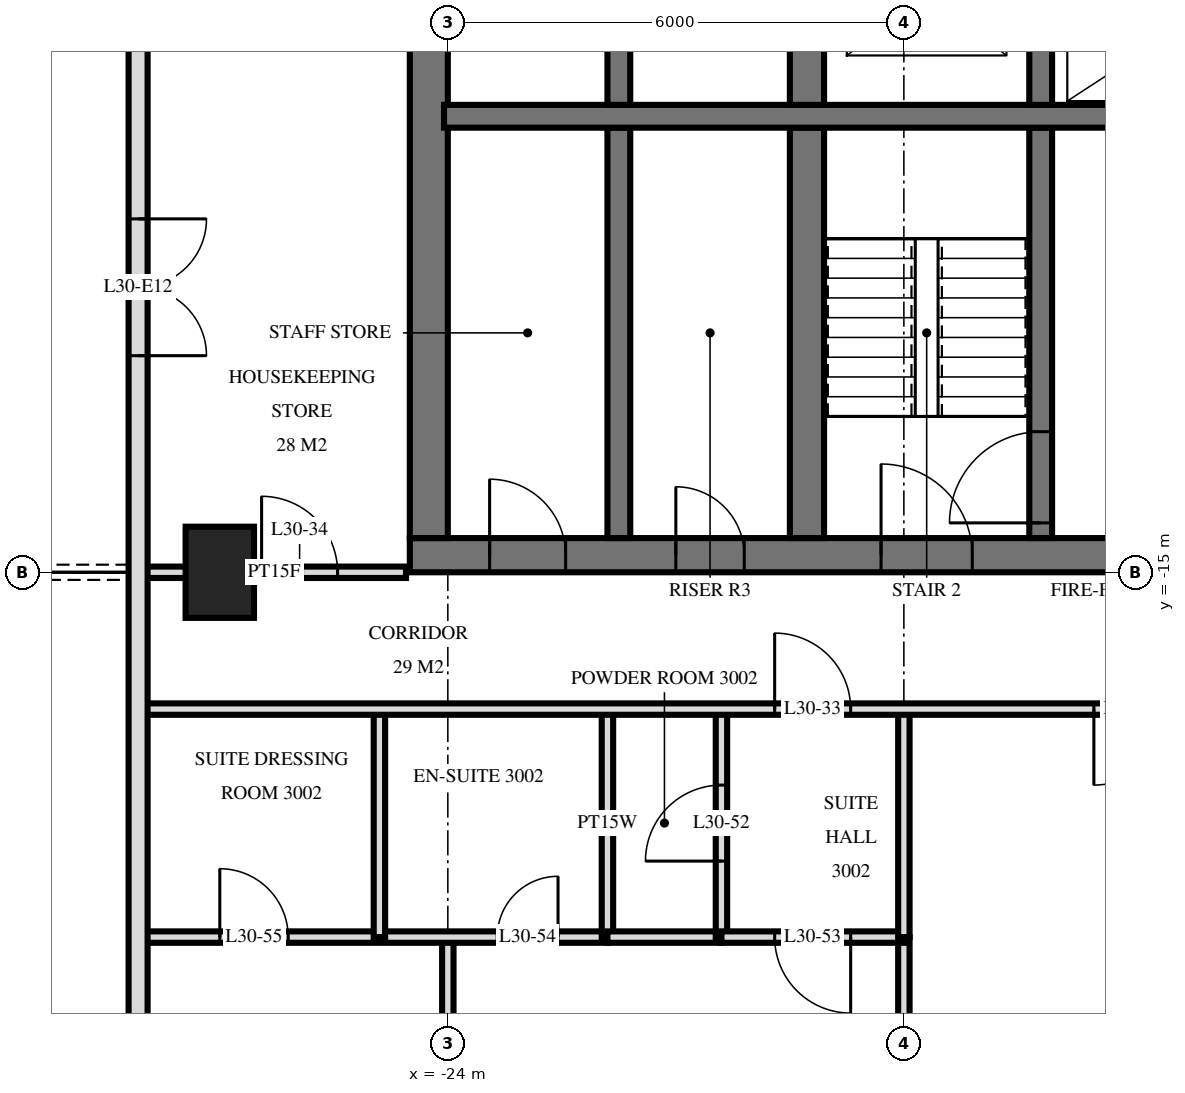
"""IFC4 building model, lengths in metres.
Left out: names, types, materials, properties, quantities, classifications, styles, units other than length and angle.
Written with IfcOpenShell. Run it as: python <this file> out.ifc"""

import sys

from ifc_helpers import new_model, si_unit, direction, frame, frame_2d, origin, origin_2d, place, context, subcontext, project, spatial, rectangle, extrude, element, fill, save


model = new_model("IFC4")
c1 = context("Model", 3, precision=1e-05, world=origin(), true_north=direction((0.0, 1.0)))
c2 = subcontext(c1, "Body", "Model", "MODEL_VIEW")
j1 = project(units=[si_unit("LENGTHUNIT", "METRE"), si_unit("PLANEANGLEUNIT", "RADIAN")], contexts=[c1])
p1 = place(None, origin())
s1 = spatial("IfcSite", under=j1, at=p1, CompositionType="ELEMENT")
p2 = place(p1, origin())
s2 = spatial("IfcBuilding", under=s1, at=p2, CompositionType="ELEMENT")
p3 = place(p2, frame((0.0, 0.0, 120.0)))
s3 = spatial("IfcBuildingStorey", under=s2, at=p3, CompositionType="ELEMENT", Elevation=120.0)
p4 = place(p3, frame((-27.0, -15.0, 0.0), z_axis=(0.0, 0.0, 1.0), x_axis=(0.0, 1.0, 0.0)))
e1 = element("IfcColumn", 1, at=p4, inside=s3, PredefinedType="COLUMN", context=c2, shape_type="SweptSolid", body=[
    extrude(rectangle(XDim=1.2, YDim=0.9, at=origin_2d()), origin(), (0.0, 0.0, 1.0), 3.6),
])
p5 = place(p3, frame((-24.5, -14.775, 0.0), z_axis=(0.0, 0.0, 1.0), x_axis=(1.0, 0.0, 0.0)))
e2 = element("IfcWall", 2, at=p5, inside=s3, PredefinedType="SHEAR", context=c2, shape_type="SweptSolid", body=[
    extrude(rectangle(XDim=14.5, YDim=0.45, at=frame_2d((7.25, 0.0))), origin(), (0.0, 0.0, 1.0), 3.6),
])
p6 = place(p5, frame((6.2, 0.0, 0.0)))
e3 = element("IfcOpeningElement", 3, at=p6, cuts=e2, PredefinedType="OPENING", context=c2, shape_type="SweptSolid", body=[
    extrude(rectangle(XDim=1.2, YDim=2.1, at=frame_2d((0.6, 1.05))), frame((0.0, 0.235, 0.0), z_axis=(0.0, -1.0, 0.0), x_axis=(1.0, 0.0, 0.0)), (0.0, 0.0, 1.0), 0.47),
])
p7 = place(p5, frame((9.25, 0.0, 0.0)))
e4 = element("IfcOpeningElement", 4, at=p7, cuts=e2, PredefinedType="OPENING", context=c2, shape_type="SweptSolid", body=[
    extrude(rectangle(XDim=1.1, YDim=2.1, at=frame_2d((0.55, 1.05))), frame((0.0, 0.235, 0.0), z_axis=(0.0, -1.0, 0.0), x_axis=(1.0, 0.0, 0.0)), (0.0, 0.0, 1.0), 0.47),
])
p8 = place(p5, frame((3.5, 0.0, 0.0)))
e5 = element("IfcOpeningElement", 5, at=p8, cuts=e2, PredefinedType="OPENING", context=c2, shape_type="SweptSolid", body=[
    extrude(rectangle(XDim=0.9, YDim=2.1, at=frame_2d((0.45, 1.05))), frame((0.0, 0.235, 0.0), z_axis=(0.0, -1.0, 0.0), x_axis=(1.0, 0.0, 0.0)), (0.0, 0.0, 1.0), 0.47),
])
p9 = place(p5, frame((1.05, 0.0, 0.0)))
e6 = element("IfcOpeningElement", 6, at=p9, cuts=e2, PredefinedType="OPENING", context=c2, shape_type="SweptSolid", body=[
    extrude(rectangle(XDim=1.0, YDim=2.1, at=frame_2d((0.5, 1.05))), frame((0.0, 0.235, 0.0), z_axis=(0.0, -1.0, 0.0), x_axis=(1.0, 0.0, 0.0)), (0.0, 0.0, 1.0), 0.47),
])
p10 = place(p3, frame((-24.25, -14.55, 0.0), z_axis=(0.0, 0.0, 1.0), x_axis=(0.0, 1.0, 0.0)))
e7 = element("IfcWall", 7, at=p10, inside=s3, PredefinedType="SHEAR", context=c2, shape_type="SweptSolid", body=[
    extrude(rectangle(XDim=14.1, YDim=0.5, at=frame_2d((7.05, 0.0))), origin(), (0.0, 0.0, 1.0), 3.6),
])
p11 = place(p3, frame((-24.05, -9.0, 0.0), z_axis=(0.0, 0.0, 1.0), x_axis=(1.0, 0.0, 0.0)))
e8 = element("IfcWall", 8, at=p11, inside=s3, PredefinedType="SHEAR", context=c2, shape_type="SweptSolid", body=[
    extrude(rectangle(XDim=13.7, YDim=0.3, at=frame_2d((6.85, 0.0))), origin(), (0.0, 0.0, 1.0), 3.6),
])
p12 = place(p11, frame((8.8, 0.0, 0.0)))
e9 = element("IfcOpeningElement", 9, at=p12, cuts=e8, PredefinedType="OPENING", context=c2, shape_type="SweptSolid", body=[
    extrude(rectangle(XDim=1.1, YDim=2.1, at=frame_2d((0.55, 1.05))), frame((0.0, 0.16, 0.0), z_axis=(0.0, -1.0, 0.0), x_axis=(1.0, 0.0, 0.0)), (0.0, 0.0, 1.0), 0.32),
])
p13 = place(p3, frame((-16.2, -8.85, 0.0), z_axis=(0.0, 0.0, 1.0), x_axis=(0.0, 1.0, 0.0)))
e10 = element("IfcWall", 10, at=p13, inside=s3, PredefinedType="SHEAR", context=c2, shape_type="SweptSolid", body=[
    extrude(rectangle(XDim=2.3, YDim=0.3, at=frame_2d((1.15, 0.0))), origin(), (0.0, 0.0, 1.0), 3.6),
])
p14 = place(p3, frame((-16.2, -14.55, 0.0), z_axis=(0.0, 0.0, 1.0), x_axis=(0.0, 1.0, 0.0)))
e11 = element("IfcWall", 11, at=p14, inside=s3, PredefinedType="SHEAR", context=c2, shape_type="SweptSolid", body=[
    extrude(rectangle(XDim=5.4, YDim=0.3, at=frame_2d((2.7, 0.0))), origin(), (0.0, 0.0, 1.0), 3.6),
])
p15 = place(p14, frame((0.2, 0.0, 0.0)))
e12 = element("IfcOpeningElement", 12, at=p15, cuts=e11, PredefinedType="OPENING", context=c2, shape_type="SweptSolid", body=[
    extrude(rectangle(XDim=1.2, YDim=2.1, at=frame_2d((0.6, 1.05))), frame((0.0, 0.16, 0.0), z_axis=(0.0, -1.0, 0.0), x_axis=(1.0, 0.0, 0.0)), (0.0, 0.0, 1.0), 0.32),
])
p16 = place(p3, frame((-19.275, -8.85, 0.0), z_axis=(0.0, 0.0, 1.0), x_axis=(0.0, 1.0, 0.0)))
e13 = element("IfcWall", 13, at=p16, inside=s3, PredefinedType="SHEAR", context=c2, shape_type="SweptSolid", body=[
    extrude(rectangle(XDim=2.3, YDim=0.45, at=frame_2d((1.15, 0.0))), origin(), (0.0, 0.0, 1.0), 3.6),
])
p17 = place(p3, frame((-19.275, -14.55, 0.0), z_axis=(0.0, 0.0, 1.0), x_axis=(0.0, 1.0, 0.0)))
e14 = element("IfcWall", 14, at=p17, inside=s3, PredefinedType="SHEAR", context=c2, shape_type="SweptSolid", body=[
    extrude(rectangle(XDim=5.4, YDim=0.45, at=frame_2d((2.7, 0.0))), origin(), (0.0, 0.0, 1.0), 3.6),
])
p18 = place(p3, frame((-21.75, -8.85, 0.0), z_axis=(0.0, 0.0, 1.0), x_axis=(0.0, 1.0, 0.0)))
e15 = element("IfcWall", 15, at=p18, inside=s3, PredefinedType="SHEAR", context=c2, shape_type="SweptSolid", body=[
    extrude(rectangle(XDim=2.3, YDim=0.3, at=frame_2d((1.15, 0.0))), origin(), (0.0, 0.0, 1.0), 3.6),
])
p19 = place(p3, frame((-21.75, -14.55, 0.0), z_axis=(0.0, 0.0, 1.0), x_axis=(0.0, 1.0, 0.0)))
e16 = element("IfcWall", 16, at=p19, inside=s3, PredefinedType="SHEAR", context=c2, shape_type="SweptSolid", body=[
    extrude(rectangle(XDim=5.4, YDim=0.3, at=frame_2d((2.7, 0.0))), origin(), (0.0, 0.0, 1.0), 3.6),
])
p20 = place(p3, frame((-28.075, -3.325, 0.0), z_axis=(0.0, 0.0, 1.0), x_axis=(0.0, -1.0, 0.0)))
e17 = element("IfcWall", 17, at=p20, inside=s3, PredefinedType="SOLIDWALL", context=c2, shape_type="SweptSolid", body=[
    extrude(rectangle(XDim=25.951, YDim=0.25, at=frame_2d((12.975, 0.0))), origin(), (0.0, 0.0, 1.0), 3.32),
])
p21 = place(p20, frame((7.025, 0.0, 0.0)))
e18 = element("IfcOpeningElement", 18, at=p21, cuts=e17, PredefinedType="OPENING", context=c2, shape_type="SweptSolid", body=[
    extrude(rectangle(XDim=1.8, YDim=2.4, at=frame_2d((0.9, 1.2))), frame((0.0, 0.135, 0.0), z_axis=(0.0, -1.0, 0.0), x_axis=(1.0, 0.0, 0.0)), (0.0, 0.0, 1.0), 0.27),
])
p22 = place(p20, frame((18.175, 0.0, 0.0)))
e19 = element("IfcOpeningElement", 19, at=p22, cuts=e17, PredefinedType="OPENING", context=c2, shape_type="SweptSolid", body=[
    extrude(rectangle(XDim=1.8, YDim=2.4, at=frame_2d((0.9, 1.2))), frame((0.0, 0.135, 0.0), z_axis=(0.0, -1.0, 0.0), x_axis=(1.0, 0.0, 0.0)), (0.0, 0.0, 1.0), 0.27),
])
p23 = place(p20, frame((21.075, 0.0, 0.0)))
e20 = element("IfcOpeningElement", 20, at=p23, cuts=e17, PredefinedType="OPENING", context=c2, shape_type="SweptSolid", body=[
    extrude(rectangle(XDim=1.8, YDim=2.4, at=frame_2d((0.9, 1.2))), frame((0.0, 0.135, 0.0), z_axis=(0.0, -1.0, 0.0), x_axis=(1.0, 0.0, 0.0)), (0.0, 0.0, 1.0), 0.27),
])
p24 = place(p20, frame((23.825, 0.0, 0.3)))
e21 = element("IfcOpeningElement", 21, at=p24, cuts=e17, PredefinedType="OPENING", context=c2, shape_type="SweptSolid", body=[
    extrude(rectangle(XDim=1.8, YDim=2.1, at=frame_2d((0.9, 1.05))), frame((0.0, 0.135, 0.0), z_axis=(0.0, -1.0, 0.0), x_axis=(1.0, 0.0, 0.0)), (0.0, 0.0, 1.0), 0.27),
])
p25 = place(p3, frame((-18.0, -19.8, 0.0), z_axis=(0.0, 0.0, 1.0), x_axis=(0.0, 1.0, 0.0)))
e22 = element("IfcWall", 22, at=p25, inside=s3, PredefinedType="PARTITIONING", context=c2, shape_type="SweptSolid", body=[
    extrude(rectangle(XDim=3.0, YDim=0.15, at=frame_2d((1.5, 0.0))), origin(), (0.0, 0.0, 1.0), 3.32),
])
p26 = place(p3, frame((-18.0, -33.62, 0.0), z_axis=(0.0, 0.0, 1.0), x_axis=(0.0, 1.0, 0.0)))
e23 = element("IfcWall", 23, at=p26, inside=s3, PredefinedType="PARTITIONING", context=c2, shape_type="SweptSolid", body=[
    extrude(rectangle(XDim=13.82, YDim=0.15, at=frame_2d((6.91, 0.0))), origin(), (0.0, 0.0, 1.0), 3.32),
])
p27 = place(p3, frame((-20.4, -19.8, 0.0), z_axis=(0.0, 0.0, 1.0), x_axis=(0.0, 1.0, 0.0)))
e24 = element("IfcWall", 24, at=p27, inside=s3, PredefinedType="PARTITIONING", context=c2, shape_type="SweptSolid", body=[
    extrude(rectangle(XDim=3.0, YDim=0.15, at=frame_2d((1.5, 0.0))), origin(), (0.0, 0.0, 1.0), 3.32),
])
p28 = place(p27, frame((1.0, 0.0, 0.0)))
e25 = element("IfcOpeningElement", 25, at=p28, cuts=e24, PredefinedType="OPENING", context=c2, shape_type="SweptSolid", body=[
    extrude(rectangle(XDim=1.0, YDim=2.1, at=frame_2d((0.5, 1.05))), frame((0.0, 0.085, 0.0), z_axis=(0.0, -1.0, 0.0), x_axis=(1.0, 0.0, 0.0)), (0.0, 0.0, 1.0), 0.17),
])
p29 = place(p3, frame((-21.9, -19.8, 0.0), z_axis=(0.0, 0.0, 1.0), x_axis=(0.0, 1.0, 0.0)))
e26 = element("IfcWall", 26, at=p29, inside=s3, PredefinedType="PLUMBINGWALL", context=c2, shape_type="SweptSolid", body=[
    extrude(rectangle(XDim=3.0, YDim=0.15, at=frame_2d((1.5, 0.0))), origin(), (0.0, 0.0, 1.0), 3.32),
])
p30 = place(p3, frame((-24.0, -33.557, 0.0), z_axis=(0.0, 0.0, 1.0), x_axis=(0.0, 1.0, 0.0)))
e27 = element("IfcWall", 27, at=p30, inside=s3, PredefinedType="PARTITIONING", context=c2, shape_type="SweptSolid", body=[
    extrude(rectangle(XDim=13.757, YDim=0.15, at=frame_2d((6.878, 0.0))), origin(), (0.0, 0.0, 1.0), 3.32),
])
p31 = place(p30, frame((6.337, 0.0, 0.0)))
e28 = element("IfcOpeningElement", 28, at=p31, cuts=e27, PredefinedType="OPENING", context=c2, shape_type="SweptSolid", body=[
    extrude(rectangle(XDim=0.9, YDim=2.1, at=frame_2d((0.45, 1.05))), frame((0.0, 0.085, 0.0), z_axis=(0.0, -1.0, 0.0), x_axis=(1.0, 0.0, 0.0)), (0.0, 0.0, 1.0), 0.17),
])
p32 = place(p3, frame((-24.9, -19.8, 0.0), z_axis=(0.0, 0.0, 1.0), x_axis=(0.0, 1.0, 0.0)))
e29 = element("IfcWall", 29, at=p32, inside=s3, PredefinedType="PARTITIONING", context=c2, shape_type="SweptSolid", body=[
    extrude(rectangle(XDim=3.0, YDim=0.15, at=frame_2d((1.5, 0.0))), origin(), (0.0, 0.0, 1.0), 3.32),
])
p33 = place(p3, frame((-20.4, -19.8, 0.0), z_axis=(0.0, 0.0, 1.0), x_axis=(1.0, 0.0, 0.0)))
e30 = element("IfcWall", 30, at=p33, inside=s3, PredefinedType="PARTITIONING", context=c2, shape_type="SweptSolid", body=[
    extrude(rectangle(XDim=2.4, YDim=0.15, at=frame_2d((1.2, 0.0))), origin(), (0.0, 0.0, 1.0), 3.32),
])
p34 = place(p33, frame((0.7, 0.0, 0.0)))
e31 = element("IfcOpeningElement", 31, at=p34, cuts=e30, PredefinedType="OPENING", context=c2, shape_type="SweptSolid", body=[
    extrude(rectangle(XDim=1.0, YDim=2.1, at=frame_2d((0.5, 1.05))), frame((0.0, 0.085, 0.0), z_axis=(0.0, -1.0, 0.0), x_axis=(1.0, 0.0, 0.0)), (0.0, 0.0, 1.0), 0.17),
])
p35 = place(p3, frame((-28.02, -19.8, 0.0), z_axis=(0.0, 0.0, 1.0), x_axis=(1.0, 0.0, 0.0)))
e32 = element("IfcWall", 32, at=p35, inside=s3, PredefinedType="PARTITIONING", context=c2, shape_type="SweptSolid", body=[
    extrude(rectangle(XDim=6.12, YDim=0.15, at=frame_2d((3.06, 0.0))), origin(), (0.0, 0.0, 1.0), 3.32),
])
p36 = place(p35, frame((4.67, 0.0, 0.0)))
e33 = element("IfcOpeningElement", 33, at=p36, cuts=e32, PredefinedType="OPENING", context=c2, shape_type="SweptSolid", body=[
    extrude(rectangle(XDim=0.8, YDim=2.1, at=frame_2d((0.4, 1.05))), frame((0.0, 0.085, 0.0), z_axis=(0.0, -1.0, 0.0), x_axis=(1.0, 0.0, 0.0)), (0.0, 0.0, 1.0), 0.17),
])
p37 = place(p35, frame((1.02, 0.0, 0.0)))
e34 = element("IfcOpeningElement", 34, at=p37, cuts=e32, PredefinedType="OPENING", context=c2, shape_type="SweptSolid", body=[
    extrude(rectangle(XDim=0.9, YDim=2.1, at=frame_2d((0.45, 1.05))), frame((0.0, 0.085, 0.0), z_axis=(0.0, -1.0, 0.0), x_axis=(1.0, 0.0, 0.0)), (0.0, 0.0, 1.0), 0.17),
])
p38 = place(p3, frame((-21.9, -19.8, 0.0), z_axis=(0.0, 0.0, 1.0), x_axis=(1.0, 0.0, 0.0)))
e35 = element("IfcWall", 35, at=p38, inside=s3, PredefinedType="PLUMBINGWALL", context=c2, shape_type="SweptSolid", body=[
    extrude(rectangle(XDim=1.5, YDim=0.15, at=frame_2d((0.75, 0.0))), origin(), (0.0, 0.0, 1.0), 3.32),
])
p39 = place(p3, frame((-28.02, -16.8, 0.0), z_axis=(0.0, 0.0, 1.0), x_axis=(1.0, 0.0, 0.0)))
e36 = element("IfcWall", 36, at=p39, inside=s3, PredefinedType="PARTITIONING", context=c2, shape_type="SweptSolid", body=[
    extrude(rectangle(XDim=56.04, YDim=0.15, at=frame_2d((28.02, 0.0))), origin(), (0.0, 0.0, 1.0), 3.32),
])
p40 = place(p39, frame((12.52, 0.0, 0.0)))
e37 = element("IfcOpeningElement", 37, at=p40, cuts=e36, PredefinedType="OPENING", context=c2, shape_type="SweptSolid", body=[
    extrude(rectangle(XDim=1.0, YDim=2.1, at=frame_2d((0.5, 1.05))), frame((0.0, 0.085, 0.0), z_axis=(0.0, -1.0, 0.0), x_axis=(1.0, 0.0, 0.0)), (0.0, 0.0, 1.0), 0.17),
])
p41 = place(p39, frame((8.32, 0.0, 0.0)))
e38 = element("IfcOpeningElement", 38, at=p41, cuts=e36, PredefinedType="OPENING", context=c2, shape_type="SweptSolid", body=[
    extrude(rectangle(XDim=1.0, YDim=2.1, at=frame_2d((0.5, 1.05))), frame((0.0, 0.085, 0.0), z_axis=(0.0, -1.0, 0.0), x_axis=(1.0, 0.0, 0.0)), (0.0, 0.0, 1.0), 0.17),
])
p42 = place(p39, frame((40.42, 0.0, 0.0)))
e39 = element("IfcOpeningElement", 39, at=p42, cuts=e36, PredefinedType="OPENING", context=c2, shape_type="SweptSolid", body=[
    extrude(rectangle(XDim=1.0, YDim=2.1, at=frame_2d((0.5, 1.05))), frame((0.0, 0.085, 0.0), z_axis=(0.0, -1.0, 0.0), x_axis=(1.0, 0.0, 0.0)), (0.0, 0.0, 1.0), 0.17),
])
p43 = place(p39, frame((46.72, 0.0, 0.0)))
e40 = element("IfcOpeningElement", 40, at=p43, cuts=e36, PredefinedType="OPENING", context=c2, shape_type="SweptSolid", body=[
    extrude(rectangle(XDim=1.0, YDim=2.1, at=frame_2d((0.5, 1.05))), frame((0.0, 0.085, 0.0), z_axis=(0.0, -1.0, 0.0), x_axis=(1.0, 0.0, 0.0)), (0.0, 0.0, 1.0), 0.17),
])
p44 = place(p39, frame((21.52, 0.0, 0.0)))
e41 = element("IfcOpeningElement", 41, at=p44, cuts=e36, PredefinedType="OPENING", context=c2, shape_type="SweptSolid", body=[
    extrude(rectangle(XDim=1.0, YDim=2.1, at=frame_2d((0.5, 1.05))), frame((0.0, 0.085, 0.0), z_axis=(0.0, -1.0, 0.0), x_axis=(1.0, 0.0, 0.0)), (0.0, 0.0, 1.0), 0.17),
])
p45 = place(p39, frame((30.52, 0.0, 0.0)))
e42 = element("IfcOpeningElement", 42, at=p45, cuts=e36, PredefinedType="OPENING", context=c2, shape_type="SweptSolid", body=[
    extrude(rectangle(XDim=1.0, YDim=2.1, at=frame_2d((0.5, 1.05))), frame((0.0, 0.085, 0.0), z_axis=(0.0, -1.0, 0.0), x_axis=(1.0, 0.0, 0.0)), (0.0, 0.0, 1.0), 0.17),
])
p46 = place(p39, frame((36.52, 0.0, 0.0)))
e43 = element("IfcOpeningElement", 43, at=p46, cuts=e36, PredefinedType="OPENING", context=c2, shape_type="SweptSolid", body=[
    extrude(rectangle(XDim=1.0, YDim=2.1, at=frame_2d((0.5, 1.05))), frame((0.0, 0.085, 0.0), z_axis=(0.0, -1.0, 0.0), x_axis=(1.0, 0.0, 0.0)), (0.0, 0.0, 1.0), 0.17),
])
p47 = place(p3, frame((-28.02, -15.0, 0.0), z_axis=(0.0, 0.0, 1.0), x_axis=(1.0, 0.0, 0.0)))
e44 = element("IfcWall", 44, at=p47, inside=s3, PredefinedType="PARTITIONING", context=c2, shape_type="SweptSolid", body=[
    extrude(rectangle(XDim=3.47, YDim=0.15, at=frame_2d((1.735, 0.0))), origin(), (0.0, 0.0, 1.0), 3.32),
])
p48 = place(p47, frame((1.57, 0.0, 0.0)))
e45 = element("IfcOpeningElement", 45, at=p48, cuts=e44, PredefinedType="OPENING", context=c2, shape_type="SweptSolid", body=[
    extrude(rectangle(XDim=1.0, YDim=2.1, at=frame_2d((0.5, 1.05))), frame((0.0, 0.085, 0.0), z_axis=(0.0, -1.0, 0.0), x_axis=(1.0, 0.0, 0.0)), (0.0, 0.0, 1.0), 0.17),
])
p49 = place(p21, origin())
e46 = element("IfcDoor", 46, at=p49, inside=s3, OperationType="DOUBLE_DOOR_SINGLE_SWING", PredefinedType="DOOR", context=c2, shape_type="SweptSolid", body=[
    extrude(rectangle(XDim=1.8, YDim=2.4, at=frame_2d((0.9, 1.2))), frame((0.0, 0.025, 0.0), z_axis=(0.0, -1.0, 0.0), x_axis=(1.0, 0.0, 0.0)), (0.0, 0.0, 1.0), 0.05),
])
fill(e18, e46)
p50 = place(p6, origin())
e47 = element("IfcDoor", 47, at=p50, inside=s3, OperationType="SINGLE_SWING_RIGHT", PredefinedType="DOOR", context=c2, shape_type="SweptSolid", body=[
    extrude(rectangle(XDim=1.2, YDim=2.1, at=frame_2d((0.6, 1.05))), frame((0.0, 0.025, 0.0), z_axis=(0.0, -1.0, 0.0), x_axis=(1.0, 0.0, 0.0)), (0.0, 0.0, 1.0), 0.05),
])
fill(e3, e47)
p51 = place(p8, origin())
e48 = element("IfcDoor", 48, at=p51, inside=s3, OperationType="SINGLE_SWING_RIGHT", PredefinedType="DOOR", context=c2, shape_type="SweptSolid", body=[
    extrude(rectangle(XDim=0.9, YDim=2.1, at=frame_2d((0.45, 1.05))), frame((0.0, 0.025, 0.0), z_axis=(0.0, -1.0, 0.0), x_axis=(1.0, 0.0, 0.0)), (0.0, 0.0, 1.0), 0.05),
])
fill(e5, e48)
p52 = place(p9, origin())
e49 = element("IfcDoor", 49, at=p52, inside=s3, OperationType="SINGLE_SWING_RIGHT", PredefinedType="DOOR", context=c2, shape_type="SweptSolid", body=[
    extrude(rectangle(XDim=1.0, YDim=2.1, at=frame_2d((0.5, 1.05))), frame((0.0, 0.025, 0.0), z_axis=(0.0, -1.0, 0.0), x_axis=(1.0, 0.0, 0.0)), (0.0, 0.0, 1.0), 0.05),
])
fill(e6, e49)
p53 = place(p15, origin())
e50 = element("IfcDoor", 50, at=p53, inside=s3, OperationType="SINGLE_SWING_RIGHT", PredefinedType="DOOR", context=c2, shape_type="SweptSolid", body=[
    extrude(rectangle(XDim=1.2, YDim=2.1, at=frame_2d((0.6, 1.05))), frame((0.0, 0.025, 0.0), z_axis=(0.0, -1.0, 0.0), x_axis=(1.0, 0.0, 0.0)), (0.0, 0.0, 1.0), 0.05),
])
fill(e12, e50)
p54 = place(p40, frame((0.5, 0.0, 0.0), z_axis=(0.0, 0.0, 1.0), x_axis=(-1.0, 0.0, 0.0)))
e51 = element("IfcDoor", 51, at=p54, inside=s3, OperationType="SINGLE_SWING_LEFT", PredefinedType="DOOR", context=c2, shape_type="SweptSolid", body=[
    extrude(rectangle(XDim=1.0, YDim=2.1, at=frame_2d((0.0, 1.05))), frame((0.0, -0.025, 0.0), z_axis=(0.0, 1.0, 0.0), x_axis=(-1.0, 0.0, 0.0)), (0.0, 0.0, 1.0), 0.05),
])
fill(e37, e51)
p55 = place(p41, origin())
e52 = element("IfcDoor", 52, at=p55, inside=s3, OperationType="SINGLE_SWING_RIGHT", PredefinedType="DOOR", context=c2, shape_type="SweptSolid", body=[
    extrude(rectangle(XDim=1.0, YDim=2.1, at=frame_2d((0.5, 1.05))), frame((0.0, 0.025, 0.0), z_axis=(0.0, -1.0, 0.0), x_axis=(1.0, 0.0, 0.0)), (0.0, 0.0, 1.0), 0.05),
])
fill(e38, e52)
p56 = place(p48, origin())
e53 = element("IfcDoor", 53, at=p56, inside=s3, OperationType="SINGLE_SWING_RIGHT", PredefinedType="DOOR", context=c2, shape_type="SweptSolid", body=[
    extrude(rectangle(XDim=1.0, YDim=2.1, at=frame_2d((0.5, 1.05))), frame((0.0, 0.025, 0.0), z_axis=(0.0, -1.0, 0.0), x_axis=(1.0, 0.0, 0.0)), (0.0, 0.0, 1.0), 0.05),
])
fill(e45, e53)
p57 = place(p28, origin())
e54 = element("IfcDoor", 54, at=p57, inside=s3, OperationType="SINGLE_SWING_RIGHT", PredefinedType="DOOR", context=c2, shape_type="SweptSolid", body=[
    extrude(rectangle(XDim=1.0, YDim=2.1, at=frame_2d((0.5, 1.05))), frame((0.0, 0.025, 0.0), z_axis=(0.0, -1.0, 0.0), x_axis=(1.0, 0.0, 0.0)), (0.0, 0.0, 1.0), 0.05),
])
fill(e25, e54)
p58 = place(p34, frame((0.5, 0.0, 0.0), z_axis=(0.0, 0.0, 1.0), x_axis=(-1.0, 0.0, 0.0)))
e55 = element("IfcDoor", 55, at=p58, inside=s3, OperationType="SINGLE_SWING_RIGHT", PredefinedType="DOOR", context=c2, shape_type="SweptSolid", body=[
    extrude(rectangle(XDim=1.0, YDim=2.1, at=frame_2d((0.0, 1.05))), frame((0.0, -0.025, 0.0), z_axis=(0.0, 1.0, 0.0), x_axis=(-1.0, 0.0, 0.0)), (0.0, 0.0, 1.0), 0.05),
])
fill(e31, e55)
p59 = place(p36, origin())
e56 = element("IfcDoor", 56, at=p59, inside=s3, OperationType="SINGLE_SWING_LEFT", PredefinedType="DOOR", context=c2, shape_type="SweptSolid", body=[
    extrude(rectangle(XDim=0.8, YDim=2.1, at=frame_2d((0.4, 1.05))), frame((0.0, 0.025, 0.0), z_axis=(0.0, -1.0, 0.0), x_axis=(1.0, 0.0, 0.0)), (0.0, 0.0, 1.0), 0.05),
])
fill(e33, e56)
p60 = place(p37, origin())
e57 = element("IfcDoor", 57, at=p60, inside=s3, OperationType="SINGLE_SWING_RIGHT", PredefinedType="DOOR", context=c2, shape_type="SweptSolid", body=[
    extrude(rectangle(XDim=0.9, YDim=2.1, at=frame_2d((0.45, 1.05))), frame((0.0, 0.025, 0.0), z_axis=(0.0, -1.0, 0.0), x_axis=(1.0, 0.0, 0.0)), (0.0, 0.0, 1.0), 0.05),
])
fill(e34, e57)
save(model, sys.argv[1])
